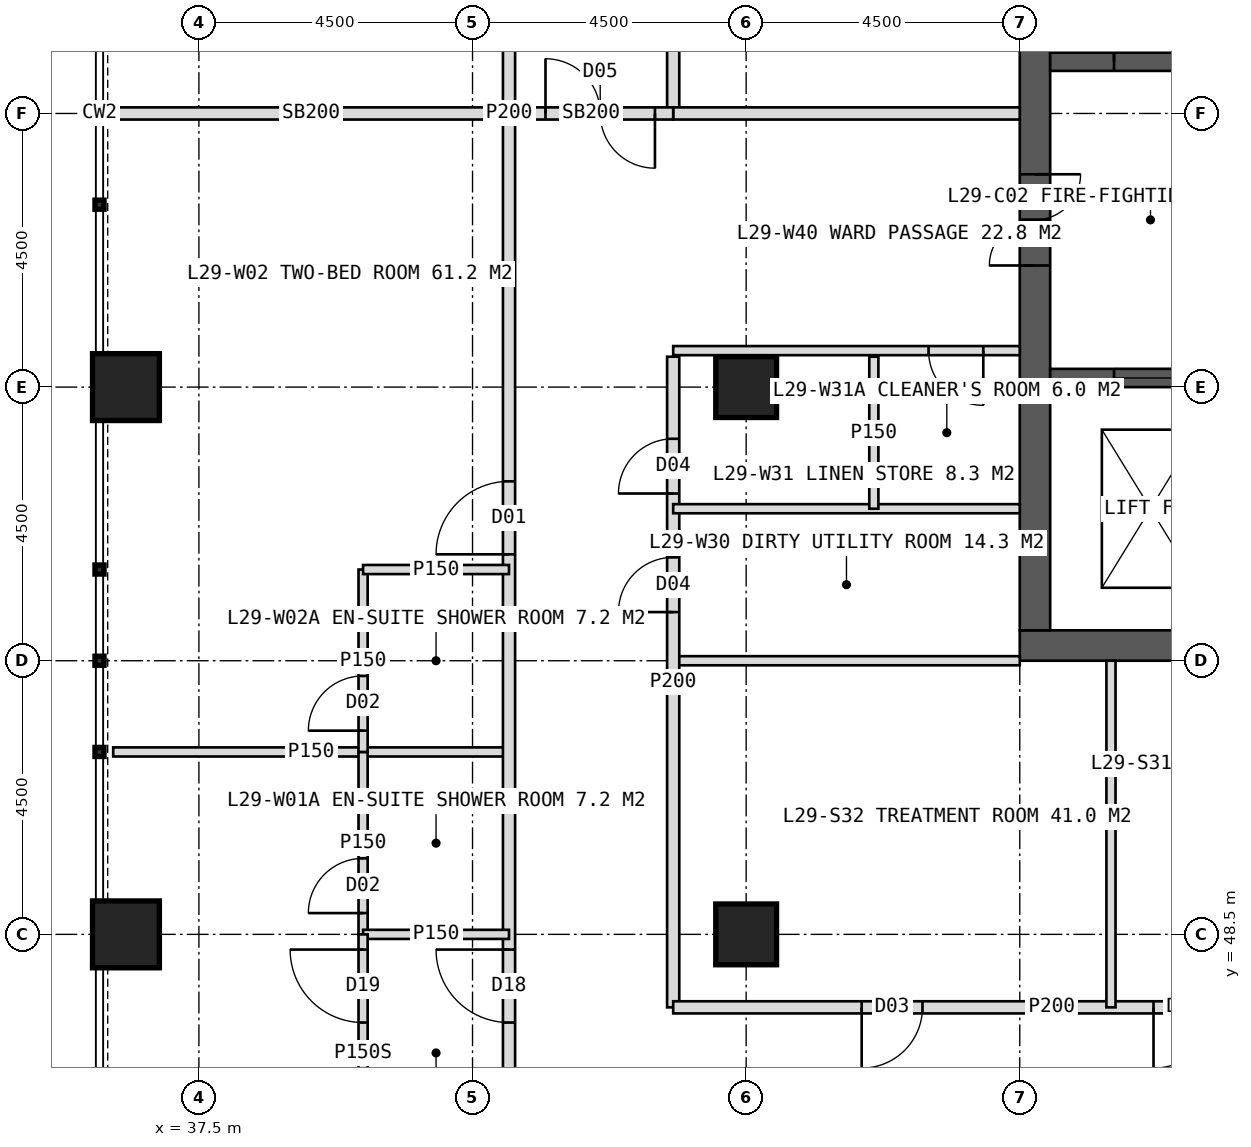
"""IFC4 building model, lengths in metres.
Left out: names, types, materials, properties, quantities, classifications, styles, units other than length and angle.
Written with IfcOpenShell. Run it as: python <this file> out.ifc"""

import sys

from ifc_helpers import new_model, si_unit, direction, frame, frame_2d, origin, origin_2d, place, context, subcontext, project, spatial, rectangle, hollow_rectangle, extrude, element, fill, save


model = new_model("IFC4")
c1 = context("Model", 3, precision=1e-05, world=origin(), true_north=direction((0.0, 1.0)))
c2 = subcontext(c1, "Body", "Model", "MODEL_VIEW")
j1 = project(units=[si_unit("LENGTHUNIT", "METRE"), si_unit("PLANEANGLEUNIT", "RADIAN")], contexts=[c1])
p1 = place(None, origin())
s1 = spatial("IfcSite", under=j1, at=p1, CompositionType="ELEMENT")
p2 = place(p1, origin())
s2 = spatial("IfcBuilding", under=s1, at=p2, CompositionType="ELEMENT")
p3 = place(p2, frame((0.0, 0.0, 124.0)))
s3 = spatial("IfcBuildingStorey", under=s2, at=p3, CompositionType="ELEMENT", Elevation=124.0)
p4 = place(p3, frame((51.0, 53.25, 0.0), z_axis=(0.0, 0.0, 1.0), x_axis=(1.0, 0.0, 0.0)))
e1 = element("IfcWall", 1, at=p4, inside=s3, PredefinedType="SHEAR", context=c2, shape_type="SweptSolid", body=[
    extrude(rectangle(XDim=18.0, YDim=0.5, at=frame_2d((9.0, 0.0))), origin(), (0.0, 0.0, 1.0), 4.0),
])
p5 = place(p4, frame((8.1, 0.0, 0.0)))
e2 = element("IfcOpeningElement", 2, at=p5, cuts=e1, PredefinedType="OPENING", context=c2, shape_type="SweptSolid", body=[
    extrude(rectangle(XDim=1.8, YDim=2.2, at=frame_2d((0.9, 1.1))), frame((0.0, 0.26, 0.0), z_axis=(0.0, -1.0, 0.0), x_axis=(1.0, 0.0, 0.0)), (0.0, 0.0, 1.0), 0.52),
])
p6 = place(p3, frame((51.25, 53.5, 0.0), z_axis=(0.0, 0.0, 1.0), x_axis=(0.0, 1.0, 0.0)))
e3 = element("IfcWall", 3, at=p6, inside=s3, PredefinedType="SHEAR", context=c2, shape_type="SweptSolid", body=[
    extrude(rectangle(XDim=17.0, YDim=0.5, at=frame_2d((8.5, 0.0))), origin(), (0.0, 0.0, 1.0), 4.0),
])
p7 = place(p6, frame((6.0, 0.0, 0.0)))
e4 = element("IfcOpeningElement", 4, at=p7, cuts=e3, PredefinedType="OPENING", context=c2, shape_type="SweptSolid", body=[
    extrude(rectangle(XDim=1.5, YDim=2.2, at=frame_2d((0.75, 1.1))), frame((0.0, 0.26, 0.0), z_axis=(0.0, -1.0, 0.0), x_axis=(1.0, 0.0, 0.0)), (0.0, 0.0, 1.0), 0.52),
])
p8 = place(p3, frame((51.5, 62.85, 0.0), z_axis=(0.0, 0.0, 1.0), x_axis=(1.0, 0.0, 0.0)))
e5 = element("IfcWall", 5, at=p8, inside=s3, PredefinedType="SHEAR", context=c2, shape_type="SweptSolid", body=[
    extrude(rectangle(XDim=3.3, YDim=0.3, at=frame_2d((1.65, 0.0))), origin(), (0.0, 0.0, 1.0), 4.0),
])
p9 = place(p8, frame((1.05, 0.0, 0.0)))
e6 = element("IfcOpeningElement", 6, at=p9, cuts=e5, PredefinedType="OPENING", context=c2, shape_type="SweptSolid", body=[
    extrude(rectangle(XDim=1.2, YDim=2.1, at=frame_2d((0.6, 1.05))), frame((0.0, 0.16, 0.0), z_axis=(0.0, -1.0, 0.0), x_axis=(1.0, 0.0, 0.0)), (0.0, 0.0, 1.0), 0.32),
])
p10 = place(p3, frame((51.5, 57.65, 0.0), z_axis=(0.0, 0.0, 1.0), x_axis=(1.0, 0.0, 0.0)))
e7 = element("IfcWall", 7, at=p10, inside=s3, PredefinedType="SHEAR", context=c2, shape_type="SweptSolid", body=[
    extrude(rectangle(XDim=3.3, YDim=0.3, at=frame_2d((1.65, 0.0))), origin(), (0.0, 0.0, 1.0), 4.0),
])
p11 = place(p10, frame((1.05, 0.0, 0.0)))
e8 = element("IfcOpeningElement", 8, at=p11, cuts=e7, PredefinedType="OPENING", context=c2, shape_type="SweptSolid", body=[
    extrude(rectangle(XDim=1.2, YDim=2.2, at=frame_2d((0.6, 1.1))), frame((0.0, 0.16, 0.0), z_axis=(0.0, -1.0, 0.0), x_axis=(1.0, 0.0, 0.0)), (0.0, 0.0, 1.0), 0.32),
])
for number, where, z_axis, x_axis in (
    (9, (46.5, 48.5, 0.0), (0.0, 0.0, 1.0), (1.0, 0.0, 0.0)),
    (10, (46.5, 57.5, 0.0), (0.0, 0.0, 1.0), (1.0, 0.0, 0.0)),
):
    element("IfcColumn", number, at=place(p3, frame(where, z_axis=z_axis, x_axis=x_axis)), inside=s3, PredefinedType="COLUMN", context=c2, shape_type="SweptSolid", body=[
        extrude(hollow_rectangle(XDim=1.0, YDim=1.0, WallThickness=0.1, at=origin_2d()), origin(), (0.0, 0.0, 1.0), 4.0),
    ])
for number, where, z_axis, x_axis in (
    (11, (36.3, 48.5, 0.0), (0.0, 0.0, 1.0), (1.0, 0.0, 0.0)),
    (12, (36.3, 57.5, 0.0), (0.0, 0.0, 1.0), (1.0, 0.0, 0.0)),
):
    element("IfcColumn", number, at=place(p3, frame(where, z_axis=z_axis, x_axis=x_axis)), inside=s3, PredefinedType="COLUMN", context=c2, shape_type="SweptSolid", body=[
        extrude(hollow_rectangle(XDim=1.1, YDim=1.1, WallThickness=0.1, at=origin_2d()), origin(), (0.0, 0.0, 1.0), 4.0),
    ])
p12 = place(p3, frame((42.6, 51.5, 0.0), z_axis=(0.0, 0.0, 1.0), x_axis=(-1.0, 0.0, 0.0)))
e13 = element("IfcWall", 13, at=p12, inside=s3, PredefinedType="PARTITIONING", context=c2, shape_type="SweptSolid", body=[
    extrude(rectangle(XDim=6.51, YDim=0.15, at=frame_2d((3.255, 0.0))), origin(), (0.0, 0.0, 1.0), 3.75),
])
p13 = place(p3, frame((42.6, 62.0, 0.0), z_axis=(0.0, 0.0, 1.0), x_axis=(-1.0, 0.0, 0.0)))
e14 = element("IfcWall", 14, at=p13, inside=s3, PredefinedType="SOLIDWALL", context=c2, shape_type="SweptSolid", body=[
    extrude(rectangle(XDim=6.51, YDim=0.2, at=frame_2d((3.255, 0.0))), origin(), (0.0, 0.0, 1.0), 2.95),
])
p14 = place(p3, frame((42.6, 44.6, 0.0), z_axis=(0.0, 0.0, 1.0), x_axis=(0.0, 1.0, 0.0)))
e15 = element("IfcWall", 15, at=p14, inside=s3, PredefinedType="PARTITIONING", context=c2, shape_type="SweptSolid", body=[
    extrude(rectangle(XDim=34.8, YDim=0.2, at=frame_2d((17.4, 0.0))), origin(), (0.0, 0.0, 1.0), 3.75),
])
p15 = place(p14, frame((2.45, 0.0, 0.0)))
e16 = element("IfcOpeningElement", 16, at=p15, cuts=e15, PredefinedType="OPENING", context=c2, shape_type="SweptSolid", body=[
    extrude(rectangle(XDim=1.2, YDim=2.2, at=frame_2d((0.6, 1.1))), frame((0.0, 0.11, 0.0), z_axis=(0.0, -1.0, 0.0), x_axis=(1.0, 0.0, 0.0)), (0.0, 0.0, 1.0), 0.22),
])
p16 = place(p14, frame((10.15, 0.0, 0.0)))
e17 = element("IfcOpeningElement", 17, at=p16, cuts=e15, PredefinedType="OPENING", context=c2, shape_type="SweptSolid", body=[
    extrude(rectangle(XDim=1.2, YDim=2.2, at=frame_2d((0.6, 1.1))), frame((0.0, 0.11, 0.0), z_axis=(0.0, -1.0, 0.0), x_axis=(1.0, 0.0, 0.0)), (0.0, 0.0, 1.0), 0.22),
])
p17 = place(p14, frame((23.45, 0.0, 0.0)))
e18 = element("IfcOpeningElement", 18, at=p17, cuts=e15, PredefinedType="OPENING", context=c2, shape_type="SweptSolid", body=[
    extrude(rectangle(XDim=1.2, YDim=2.2, at=frame_2d((0.6, 1.1))), frame((0.0, 0.11, 0.0), z_axis=(0.0, -1.0, 0.0), x_axis=(1.0, 0.0, 0.0)), (0.0, 0.0, 1.0), 0.22),
])
p18 = place(p14, frame((30.55, 0.0, 0.0)))
e19 = element("IfcOpeningElement", 19, at=p18, cuts=e15, PredefinedType="OPENING", context=c2, shape_type="SweptSolid", body=[
    extrude(rectangle(XDim=1.2, YDim=2.2, at=frame_2d((0.6, 1.1))), frame((0.0, 0.11, 0.0), z_axis=(0.0, -1.0, 0.0), x_axis=(1.0, 0.0, 0.0)), (0.0, 0.0, 1.0), 0.22),
])
p19 = place(p3, frame((40.2, 48.5, 0.0), z_axis=(0.0, 0.0, 1.0), x_axis=(0.0, 1.0, 0.0)))
e20 = element("IfcWall", 20, at=p19, inside=s3, PredefinedType="PARTITIONING", context=c2, shape_type="SweptSolid", body=[
    extrude(rectangle(XDim=3.0, YDim=0.15, at=frame_2d((1.5, 0.0))), origin(), (0.0, 0.0, 1.0), 3.75),
])
p20 = place(p19, frame((0.35, 0.0, 0.0)))
e21 = element("IfcOpeningElement", 21, at=p20, cuts=e20, PredefinedType="OPENING", context=c2, shape_type="SweptSolid", body=[
    extrude(rectangle(XDim=0.9, YDim=2.1, at=frame_2d((0.45, 1.05))), frame((0.0, 0.085, 0.0), z_axis=(0.0, -1.0, 0.0), x_axis=(1.0, 0.0, 0.0)), (0.0, 0.0, 1.0), 0.17),
])
p21 = place(p3, frame((42.6, 48.5, 0.0), z_axis=(0.0, 0.0, 1.0), x_axis=(-1.0, 0.0, 0.0)))
e22 = element("IfcWall", 22, at=p21, inside=s3, PredefinedType="PARTITIONING", context=c2, shape_type="SweptSolid", body=[
    extrude(rectangle(XDim=2.4, YDim=0.15, at=frame_2d((1.2, 0.0))), origin(), (0.0, 0.0, 1.0), 2.95),
])
p22 = place(p3, frame((40.2, 44.6, 0.0), z_axis=(0.0, 0.0, 1.0), x_axis=(0.0, 1.0, 0.0)))
e23 = element("IfcWall", 23, at=p22, inside=s3, PredefinedType="PARTITIONING", context=c2, shape_type="SweptSolid", body=[
    extrude(rectangle(XDim=3.9, YDim=0.15, at=frame_2d((1.95, 0.0))), origin(), (0.0, 0.0, 1.0), 3.75),
])
p23 = place(p22, frame((2.45, 0.0, 0.0)))
e24 = element("IfcOpeningElement", 24, at=p23, cuts=e23, PredefinedType="OPENING", context=c2, shape_type="SweptSolid", body=[
    extrude(rectangle(XDim=1.2, YDim=2.2, at=frame_2d((0.6, 1.1))), frame((0.0, 0.085, 0.0), z_axis=(0.0, -1.0, 0.0), x_axis=(1.0, 0.0, 0.0)), (0.0, 0.0, 1.0), 0.17),
])
p24 = place(p3, frame((40.2, 51.5, 0.0), z_axis=(0.0, 0.0, 1.0), x_axis=(0.0, 1.0, 0.0)))
e25 = element("IfcWall", 25, at=p24, inside=s3, PredefinedType="PARTITIONING", context=c2, shape_type="SweptSolid", body=[
    extrude(rectangle(XDim=3.0, YDim=0.15, at=frame_2d((1.5, 0.0))), origin(), (0.0, 0.0, 1.0), 3.75),
])
p25 = place(p24, frame((0.35, 0.0, 0.0)))
e26 = element("IfcOpeningElement", 26, at=p25, cuts=e25, PredefinedType="OPENING", context=c2, shape_type="SweptSolid", body=[
    extrude(rectangle(XDim=0.9, YDim=2.1, at=frame_2d((0.45, 1.05))), frame((0.0, 0.085, 0.0), z_axis=(0.0, -1.0, 0.0), x_axis=(1.0, 0.0, 0.0)), (0.0, 0.0, 1.0), 0.17),
])
p26 = place(p3, frame((42.6, 54.5, 0.0), z_axis=(0.0, 0.0, 1.0), x_axis=(-1.0, 0.0, 0.0)))
e27 = element("IfcWall", 27, at=p26, inside=s3, PredefinedType="PARTITIONING", context=c2, shape_type="SweptSolid", body=[
    extrude(rectangle(XDim=2.4, YDim=0.15, at=frame_2d((1.2, 0.0))), origin(), (0.0, 0.0, 1.0), 3.75),
])
p27 = place(p3, frame((51.0, 53.0, 0.0), z_axis=(0.0, 0.0, 1.0), x_axis=(-1.0, 0.0, 0.0)))
e28 = element("IfcWall", 28, at=p27, inside=s3, PredefinedType="PARTITIONING", context=c2, shape_type="SweptSolid", body=[
    extrude(rectangle(XDim=5.7, YDim=0.15, at=frame_2d((2.85, 0.0))), origin(), (0.0, 0.0, 1.0), 3.75),
])
p28 = place(p3, frame((45.3, 47.3, 0.0), z_axis=(0.0, 0.0, 1.0), x_axis=(0.0, 1.0, 0.0)))
e29 = element("IfcWall", 29, at=p28, inside=s3, PredefinedType="PARTITIONING", context=c2, shape_type="SweptSolid", body=[
    extrude(rectangle(XDim=10.7, YDim=0.2, at=frame_2d((5.35, 0.0))), origin(), (0.0, 0.0, 1.0), 3.75),
])
p29 = place(p28, frame((6.5, 0.0, 0.0)))
e30 = element("IfcOpeningElement", 30, at=p29, cuts=e29, PredefinedType="OPENING", context=c2, shape_type="SweptSolid", body=[
    extrude(rectangle(XDim=0.9, YDim=2.1, at=frame_2d((0.45, 1.05))), frame((0.0, 0.11, 0.0), z_axis=(0.0, -1.0, 0.0), x_axis=(1.0, 0.0, 0.0)), (0.0, 0.0, 1.0), 0.22),
])
p30 = place(p28, frame((8.45, 0.0, 0.0)))
e31 = element("IfcOpeningElement", 31, at=p30, cuts=e29, PredefinedType="OPENING", context=c2, shape_type="SweptSolid", body=[
    extrude(rectangle(XDim=0.9, YDim=2.1, at=frame_2d((0.45, 1.05))), frame((0.0, 0.11, 0.0), z_axis=(0.0, -1.0, 0.0), x_axis=(1.0, 0.0, 0.0)), (0.0, 0.0, 1.0), 0.22),
])
p31 = place(p3, frame((45.3, 62.0, 0.0), z_axis=(0.0, 0.0, 1.0), x_axis=(0.0, 1.0, 0.0)))
e32 = element("IfcWall", 32, at=p31, inside=s3, PredefinedType="PARTITIONING", context=c2, shape_type="SweptSolid", body=[
    extrude(rectangle(XDim=14.7, YDim=0.2, at=frame_2d((7.35, 0.0))), origin(), (0.0, 0.0, 1.0), 3.75),
])
p32 = place(p31, frame((1.45, 0.0, 0.0)))
e33 = element("IfcOpeningElement", 33, at=p32, cuts=e32, PredefinedType="OPENING", context=c2, shape_type="SweptSolid", body=[
    extrude(rectangle(XDim=1.0, YDim=2.1, at=frame_2d((0.5, 1.05))), frame((0.0, 0.11, 0.0), z_axis=(0.0, -1.0, 0.0), x_axis=(1.0, 0.0, 0.0)), (0.0, 0.0, 1.0), 0.22),
])
p33 = place(p31, frame((11.35, 0.0, 0.0)))
e34 = element("IfcOpeningElement", 34, at=p33, cuts=e32, PredefinedType="OPENING", context=c2, shape_type="SweptSolid", body=[
    extrude(rectangle(XDim=1.0, YDim=2.1, at=frame_2d((0.5, 1.05))), frame((0.0, 0.11, 0.0), z_axis=(0.0, -1.0, 0.0), x_axis=(1.0, 0.0, 0.0)), (0.0, 0.0, 1.0), 0.22),
])
p34 = place(p3, frame((51.0, 58.1, 0.0), z_axis=(0.0, 0.0, 1.0), x_axis=(-1.0, 0.0, 0.0)))
e35 = element("IfcWall", 35, at=p34, inside=s3, PredefinedType="PARTITIONING", context=c2, shape_type="SweptSolid", body=[
    extrude(rectangle(XDim=5.7, YDim=0.15, at=frame_2d((2.85, 0.0))), origin(), (0.0, 0.0, 1.0), 3.75),
])
p35 = place(p34, frame((0.6, 0.0, 0.0)))
e36 = element("IfcOpeningElement", 36, at=p35, cuts=e35, PredefinedType="OPENING", context=c2, shape_type="SweptSolid", body=[
    extrude(rectangle(XDim=0.9, YDim=2.1, at=frame_2d((0.45, 1.05))), frame((0.0, 0.085, 0.0), z_axis=(0.0, -1.0, 0.0), x_axis=(1.0, 0.0, 0.0)), (0.0, 0.0, 1.0), 0.17),
])
p36 = place(p3, frame((51.0, 62.0, 0.0), z_axis=(0.0, 0.0, 1.0), x_axis=(-1.0, 0.0, 0.0)))
e37 = element("IfcWall", 37, at=p36, inside=s3, PredefinedType="SOLIDWALL", context=c2, shape_type="SweptSolid", body=[
    extrude(rectangle(XDim=5.7, YDim=0.2, at=frame_2d((2.85, 0.0))), origin(), (0.0, 0.0, 1.0), 2.95),
])
p37 = place(p3, frame((51.0, 55.5, 0.0), z_axis=(0.0, 0.0, 1.0), x_axis=(-1.0, 0.0, 0.0)))
e38 = element("IfcWall", 38, at=p37, inside=s3, PredefinedType="PARTITIONING", context=c2, shape_type="SweptSolid", body=[
    extrude(rectangle(XDim=5.7, YDim=0.15, at=frame_2d((2.85, 0.0))), origin(), (0.0, 0.0, 1.0), 3.75),
])
p38 = place(p3, frame((48.6, 55.5, 0.0), z_axis=(0.0, 0.0, 1.0), x_axis=(0.0, 1.0, 0.0)))
e39 = element("IfcWall", 39, at=p38, inside=s3, PredefinedType="PARTITIONING", context=c2, shape_type="SweptSolid", body=[
    extrude(rectangle(XDim=2.5, YDim=0.15, at=frame_2d((1.25, 0.0))), origin(), (0.0, 0.0, 1.0), 3.75),
])
p39 = place(p3, frame((57.75, 47.3, 0.0), z_axis=(0.0, 0.0, 1.0), x_axis=(-1.0, 0.0, 0.0)))
e40 = element("IfcWall", 40, at=p39, inside=s3, PredefinedType="PARTITIONING", context=c2, shape_type="SweptSolid", body=[
    extrude(rectangle(XDim=12.45, YDim=0.2, at=frame_2d((6.225, 0.0))), origin(), (0.0, 0.0, 1.0), 3.75),
])
p40 = place(p39, frame((3.55, 0.0, 0.0)))
e41 = element("IfcOpeningElement", 41, at=p40, cuts=e40, PredefinedType="OPENING", context=c2, shape_type="SweptSolid", body=[
    extrude(rectangle(XDim=1.0, YDim=2.1, at=frame_2d((0.5, 1.05))), frame((0.0, 0.11, 0.0), z_axis=(0.0, -1.0, 0.0), x_axis=(1.0, 0.0, 0.0)), (0.0, 0.0, 1.0), 0.22),
])
p41 = place(p39, frame((8.35, 0.0, 0.0)))
e42 = element("IfcOpeningElement", 42, at=p41, cuts=e40, PredefinedType="OPENING", context=c2, shape_type="SweptSolid", body=[
    extrude(rectangle(XDim=1.0, YDim=2.1, at=frame_2d((0.5, 1.05))), frame((0.0, 0.11, 0.0), z_axis=(0.0, -1.0, 0.0), x_axis=(1.0, 0.0, 0.0)), (0.0, 0.0, 1.0), 0.22),
])
p42 = place(p3, frame((52.5, 53.0, 0.0), z_axis=(0.0, 0.0, 1.0), x_axis=(0.0, -1.0, 0.0)))
e43 = element("IfcWall", 43, at=p42, inside=s3, PredefinedType="PARTITIONING", context=c2, shape_type="SweptSolid", body=[
    extrude(rectangle(XDim=5.7, YDim=0.15, at=frame_2d((2.85, 0.0))), origin(), (0.0, 0.0, 1.0), 3.75),
])
p43 = place(p3, frame((45.3, 62.0, 0.0), z_axis=(0.0, 0.0, 1.0), x_axis=(-1.0, 0.0, 0.0)))
e44 = element("IfcWall", 44, at=p43, inside=s3, PredefinedType="SOLIDWALL", context=c2, shape_type="SweptSolid", body=[
    extrude(rectangle(XDim=2.7, YDim=0.2, at=frame_2d((1.35, 0.0))), origin(), (0.0, 0.0, 1.0), 2.95),
])
p44 = place(p43, frame((0.3, 0.0, 0.0)))
e45 = element("IfcOpeningElement", 45, at=p44, cuts=e44, PredefinedType="OPENING", context=c2, shape_type="SweptSolid", body=[
    extrude(rectangle(XDim=1.8, YDim=2.2, at=frame_2d((0.9, 1.1))), frame((0.0, 0.11, 0.0), z_axis=(0.0, -1.0, 0.0), x_axis=(1.0, 0.0, 0.0)), (0.0, 0.0, 1.0), 0.22),
])
p45 = place(p23, origin())
e46 = element("IfcDoor", 46, at=p45, inside=s3, OperationType="SINGLE_SWING_RIGHT", PredefinedType="DOOR", context=c2, shape_type="SweptSolid", body=[
    extrude(rectangle(XDim=1.2, YDim=2.2, at=frame_2d((0.6, 1.1))), frame((0.0, 0.025, 0.0), z_axis=(0.0, -1.0, 0.0), x_axis=(1.0, 0.0, 0.0)), (0.0, 0.0, 1.0), 0.05),
])
fill(e24, e46)
p46 = place(p15, origin())
e47 = element("IfcDoor", 47, at=p46, inside=s3, OperationType="SINGLE_SWING_RIGHT", PredefinedType="DOOR", context=c2, shape_type="SweptSolid", body=[
    extrude(rectangle(XDim=1.2, YDim=2.2, at=frame_2d((0.6, 1.1))), frame((0.0, 0.025, 0.0), z_axis=(0.0, -1.0, 0.0), x_axis=(1.0, 0.0, 0.0)), (0.0, 0.0, 1.0), 0.05),
])
fill(e16, e47)
p47 = place(p20, origin())
e48 = element("IfcDoor", 48, at=p47, inside=s3, OperationType="SINGLE_SWING_LEFT", PredefinedType="DOOR", context=c2, shape_type="SweptSolid", body=[
    extrude(rectangle(XDim=0.9, YDim=2.1, at=frame_2d((0.45, 1.05))), frame((0.0, 0.025, 0.0), z_axis=(0.0, -1.0, 0.0), x_axis=(1.0, 0.0, 0.0)), (0.0, 0.0, 1.0), 0.05),
])
fill(e21, e48)
p48 = place(p16, origin())
e49 = element("IfcDoor", 49, at=p48, inside=s3, OperationType="SINGLE_SWING_LEFT", PredefinedType="DOOR", context=c2, shape_type="SweptSolid", body=[
    extrude(rectangle(XDim=1.2, YDim=2.2, at=frame_2d((0.6, 1.1))), frame((0.0, 0.025, 0.0), z_axis=(0.0, -1.0, 0.0), x_axis=(1.0, 0.0, 0.0)), (0.0, 0.0, 1.0), 0.05),
])
fill(e17, e49)
p49 = place(p25, origin())
e50 = element("IfcDoor", 50, at=p49, inside=s3, OperationType="SINGLE_SWING_LEFT", PredefinedType="DOOR", context=c2, shape_type="SweptSolid", body=[
    extrude(rectangle(XDim=0.9, YDim=2.1, at=frame_2d((0.45, 1.05))), frame((0.0, 0.025, 0.0), z_axis=(0.0, -1.0, 0.0), x_axis=(1.0, 0.0, 0.0)), (0.0, 0.0, 1.0), 0.05),
])
fill(e26, e50)
p50 = place(p29, origin())
e51 = element("IfcDoor", 51, at=p50, inside=s3, OperationType="SINGLE_SWING_LEFT", PredefinedType="DOOR", context=c2, shape_type="SweptSolid", body=[
    extrude(rectangle(XDim=0.9, YDim=2.1, at=frame_2d((0.45, 1.05))), frame((0.0, 0.025, 0.0), z_axis=(0.0, -1.0, 0.0), x_axis=(1.0, 0.0, 0.0)), (0.0, 0.0, 1.0), 0.05),
])
fill(e30, e51)
p51 = place(p35, origin())
e52 = element("IfcDoor", 52, at=p51, inside=s3, OperationType="SINGLE_SWING_LEFT", PredefinedType="DOOR", context=c2, shape_type="SweptSolid", body=[
    extrude(rectangle(XDim=0.9, YDim=2.1, at=frame_2d((0.45, 1.05))), frame((0.0, 0.025, 0.0), z_axis=(0.0, -1.0, 0.0), x_axis=(1.0, 0.0, 0.0)), (0.0, 0.0, 1.0), 0.05),
])
fill(e36, e52)
p52 = place(p30, origin())
e53 = element("IfcDoor", 53, at=p52, inside=s3, OperationType="SINGLE_SWING_LEFT", PredefinedType="DOOR", context=c2, shape_type="SweptSolid", body=[
    extrude(rectangle(XDim=0.9, YDim=2.1, at=frame_2d((0.45, 1.05))), frame((0.0, 0.025, 0.0), z_axis=(0.0, -1.0, 0.0), x_axis=(1.0, 0.0, 0.0)), (0.0, 0.0, 1.0), 0.05),
])
fill(e31, e53)
p53 = place(p40, origin())
e54 = element("IfcDoor", 54, at=p53, inside=s3, OperationType="SINGLE_SWING_RIGHT", PredefinedType="DOOR", context=c2, shape_type="SweptSolid", body=[
    extrude(rectangle(XDim=1.0, YDim=2.1, at=frame_2d((0.5, 1.05))), frame((0.0, 0.025, 0.0), z_axis=(0.0, -1.0, 0.0), x_axis=(1.0, 0.0, 0.0)), (0.0, 0.0, 1.0), 0.05),
])
fill(e41, e54)
p54 = place(p41, origin())
e55 = element("IfcDoor", 55, at=p54, inside=s3, OperationType="SINGLE_SWING_RIGHT", PredefinedType="DOOR", context=c2, shape_type="SweptSolid", body=[
    extrude(rectangle(XDim=1.0, YDim=2.1, at=frame_2d((0.5, 1.05))), frame((0.0, 0.025, 0.0), z_axis=(0.0, -1.0, 0.0), x_axis=(1.0, 0.0, 0.0)), (0.0, 0.0, 1.0), 0.05),
])
fill(e42, e55)
p55 = place(p44, origin())
e56 = element("IfcDoor", 56, at=p55, inside=s3, OperationType="DOUBLE_DOOR_DOUBLE_SWING", PredefinedType="DOOR", context=c2, shape_type="SweptSolid", body=[
    extrude(rectangle(XDim=1.8, YDim=2.2, at=frame_2d((0.9, 1.1))), frame((0.0, 0.025, 0.0), z_axis=(0.0, -1.0, 0.0), x_axis=(1.0, 0.0, 0.0)), (0.0, 0.0, 1.0), 0.05),
])
fill(e45, e56)
p56 = place(p7, origin())
e57 = element("IfcDoor", 57, at=p56, inside=s3, OperationType="DOUBLE_DOOR_SINGLE_SWING", PredefinedType="DOOR", context=c2, shape_type="SweptSolid", body=[
    extrude(rectangle(XDim=1.5, YDim=2.2, at=frame_2d((0.75, 1.1))), frame((0.0, 0.025, 0.0), z_axis=(0.0, -1.0, 0.0), x_axis=(1.0, 0.0, 0.0)), (0.0, 0.0, 1.0), 0.05),
])
fill(e4, e57)
p57 = place(p9, origin())
e58 = element("IfcDoor", 58, at=p57, inside=s3, OperationType="SINGLE_SWING_LEFT", PredefinedType="DOOR", context=c2, shape_type="SweptSolid", body=[
    extrude(rectangle(XDim=1.2, YDim=2.1, at=frame_2d((0.6, 1.05))), frame((0.0, 0.025, 0.0), z_axis=(0.0, -1.0, 0.0), x_axis=(1.0, 0.0, 0.0)), (0.0, 0.0, 1.0), 0.05),
])
fill(e6, e58)
p58 = place(p11, origin())
e59 = element("IfcDoor", 59, at=p58, inside=s3, OperationType="SLIDING_TO_LEFT", PredefinedType="DOOR", context=c2, shape_type="SweptSolid", body=[
    extrude(rectangle(XDim=1.2, YDim=2.2, at=frame_2d((0.6, 1.1))), frame((0.0, 0.025, 0.0), z_axis=(0.0, -1.0, 0.0), x_axis=(1.0, 0.0, 0.0)), (0.0, 0.0, 1.0), 0.05),
])
fill(e8, e59)
save(model, sys.argv[1])
